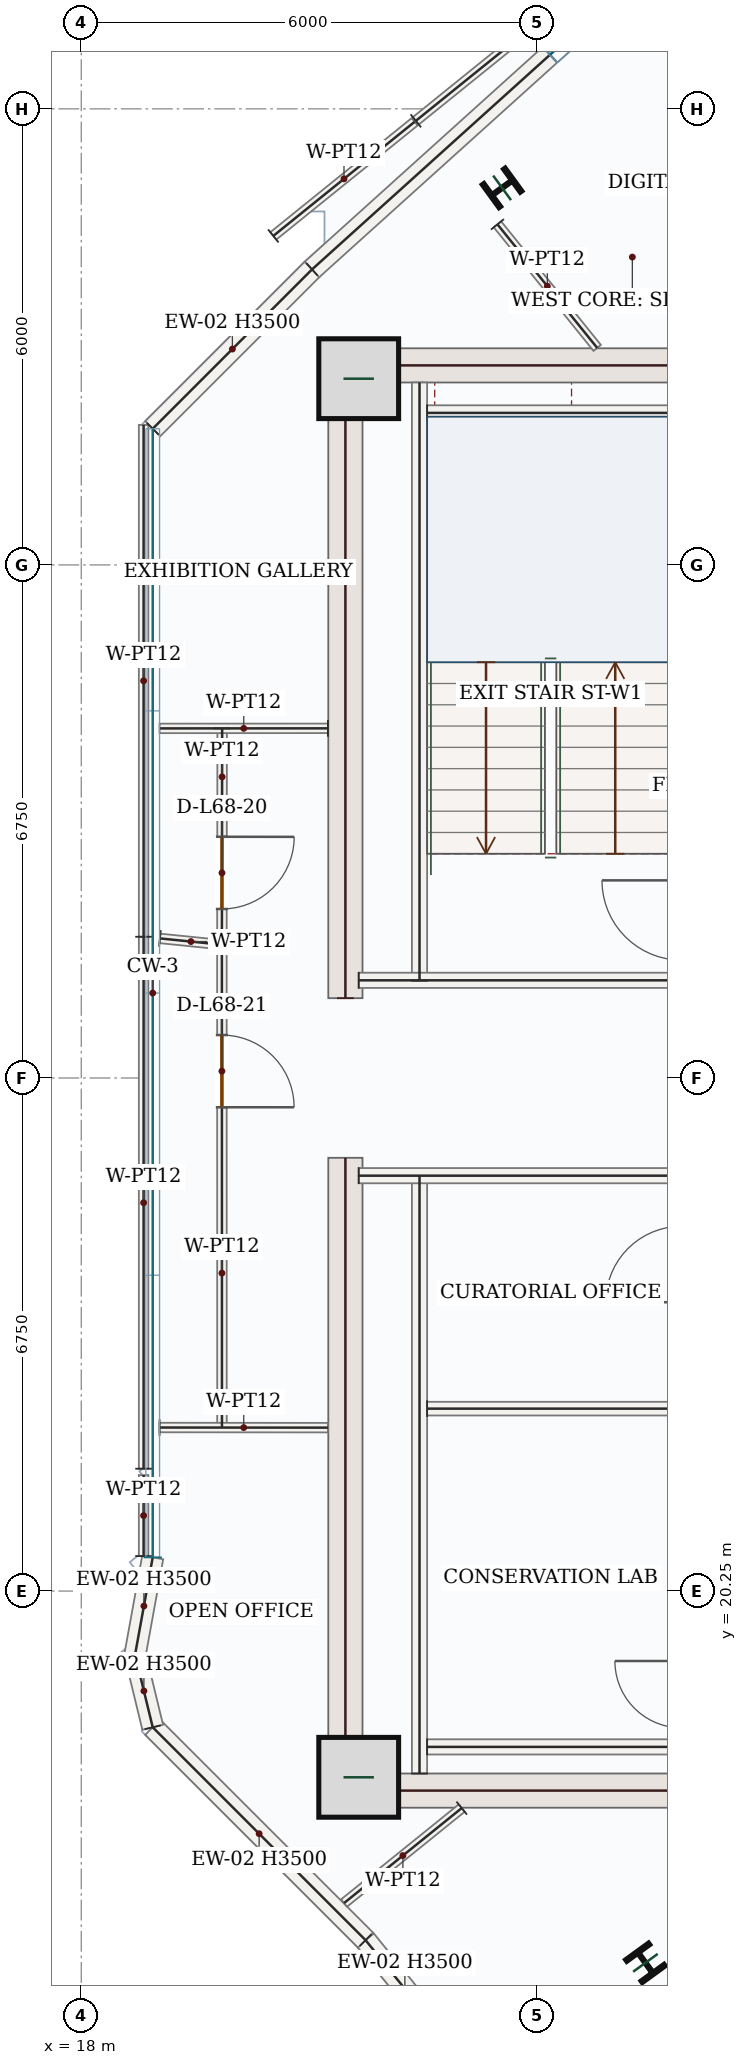
"""IFC4 building model, lengths in metres.
Left out: names, types, materials, properties, quantities, classifications, styles, units other than length and angle.
Written with IfcOpenShell. Run it as: python <this file> out.ifc"""

import sys

from ifc_helpers import new_model, si_unit, direction, frame, frame_2d, origin, origin_2d, place, context, subcontext, project, spatial, rectangle, i_section, extrude, source, transform, mapped, element, fill, save


model = new_model("IFC4")
c1 = context("Model", 3, precision=1e-05, world=origin(), true_north=direction((0.0, 1.0)))
c2 = subcontext(c1, "Body", "Model", "MODEL_VIEW")
j1 = project(units=[si_unit("LENGTHUNIT", "METRE"), si_unit("PLANEANGLEUNIT", "RADIAN")], contexts=[c1])
p1 = place(None, origin())
s1 = spatial("IfcSite", under=j1, at=p1, CompositionType="ELEMENT")
p2 = place(p1, origin())
s2 = spatial("IfcBuilding", under=s1, at=p2, CompositionType="ELEMENT")
p3 = place(p2, frame((0.0, 0.0, 284.1)))
s3 = spatial("IfcBuildingStorey", under=s2, at=p3, CompositionType="ELEMENT", Elevation=284.1)
m1 = source(origin(), c2, "Body", "SweptSolid", [
    extrude(rectangle(XDim=8.55, YDim=0.45, at=frame_2d((4.275, 0.0))), origin(), (0.0, 0.0, 1.0), 3.5),
])
for number, where, z_axis, x_axis in (
    (1, (21.475, 17.4, 0.0), (0.0, 0.0, 1.0), (0.0, 1.0, 0.0)),
    (2, (21.475, 28.05, 0.0), (0.0, 0.0, 1.0), (0.0, 1.0, 0.0)),
):
    element("IfcWall", number, at=place(p3, frame(where, z_axis=z_axis, x_axis=x_axis)), inside=s3, PredefinedType="SHEAR", context=c2, shape_type="MappedRepresentation", body=[
        mapped(m1, transform((0.0, 0.0, 0.0), x_axis=(1.0, 0.0, 0.0), y_axis=(0.0, 1.0, 0.0), z_axis=(0.0, 0.0, 1.0), scale=1.0)),
    ])
m2 = source(origin(), c2, "Body", "SweptSolid", [
    extrude(rectangle(XDim=7.1, YDim=0.45, at=frame_2d((3.55, 0.0))), origin(), (0.0, 0.0, 1.0), 3.5),
])
for number, where, z_axis, x_axis in (
    (3, (21.7, 17.625, 0.0), (0.0, 0.0, 1.0), (1.0, 0.0, 0.0)),
    (4, (21.7, 36.375, 0.0), (0.0, 0.0, 1.0), (1.0, 0.0, 0.0)),
):
    element("IfcWall", number, at=place(p3, frame(where, z_axis=z_axis, x_axis=x_axis)), inside=s3, PredefinedType="SHEAR", context=c2, shape_type="MappedRepresentation", body=[
        mapped(m2, transform((0.0, 0.0, 0.0), x_axis=(1.0, 0.0, 0.0), y_axis=(0.0, 1.0, 0.0), z_axis=(0.0, 0.0, 1.0), scale=1.0)),
    ])
m3 = source(origin(), c2, "Body", "SweptSolid", [
    extrude(rectangle(XDim=1.05, YDim=1.05, at=origin_2d()), origin(), (0.0, 0.0, 1.0), 3.75),
])
for number, where, z_axis, x_axis in (
    (5, (21.65, 17.8, 0.0), (0.0, 0.0, 1.0), (1.0, 0.0, 0.0)),
    (6, (21.65, 36.2, 0.0), (0.0, 0.0, 1.0), (1.0, 0.0, 0.0)),
):
    element("IfcColumn", number, at=place(p3, frame(where, z_axis=z_axis, x_axis=x_axis)), inside=s3, PredefinedType="COLUMN", context=c2, shape_type="MappedRepresentation", body=[
        mapped(m3, transform((0.0, 0.0, 0.0), x_axis=(1.0, 0.0, 0.0), y_axis=(0.0, 1.0, 0.0), z_axis=(0.0, 0.0, 1.0), scale=1.0)),
    ])
m4 = source(origin(), c2, "Body", "SweptSolid", [
    extrude(i_section(OverallWidth=0.374, OverallDepth=0.372, WebThickness=0.016, FlangeThickness=0.026, FilletRadius=0.018, at=origin_2d()), origin(), (0.0, 0.0, 1.0), 3.75),
])
for number, where, z_axis, x_axis in (
    (7, (23.536, 38.711, 0.0), (0.0, 0.0, 1.0), (-0.588, 0.809, 0.0)),
    (8, (25.422, 15.359, 0.0), (0.0, 0.0, 1.0), (0.809, 0.588, 0.0)),
):
    element("IfcColumn", number, at=place(p3, frame(where, z_axis=z_axis, x_axis=x_axis)), inside=s3, PredefinedType="COLUMN", context=c2, shape_type="MappedRepresentation", body=[
        mapped(m4, transform((0.0, 0.0, 0.0), x_axis=(1.0, 0.0, 0.0), y_axis=(0.0, 1.0, 0.0), z_axis=(0.0, 0.0, 1.0), scale=1.0)),
    ])
m5 = source(origin(), c2, "Body", "SweptSolid", [
    extrude(rectangle(XDim=2.964, YDim=0.28, at=frame_2d((1.482, 0.0))), origin(), (0.0, 0.0, 1.0), 3.5),
])
p4 = place(p3, frame((18.94, 35.542, 0.0), z_axis=(0.0, 0.0, 1.0), x_axis=(0.707106781187, 0.707106781187, 0.0)))
e9 = element("IfcWall", 9, at=p4, inside=s3, PredefinedType="SOLIDWALL", context=c2, shape_type="MappedRepresentation", body=[
    mapped(m5, transform((0.0, 0.0, 0.0), x_axis=(1.0, 0.0, 0.0), y_axis=(0.0, 1.0, 0.0), z_axis=(0.0, 0.0, 1.0), scale=1.0)),
])
p5 = place(p3, frame((21.036, 37.638, 0.0), z_axis=(0.0, 0.0, 1.0), x_axis=(0.742587457262, 0.669749108486, 0.0)))
e10 = element("IfcWall", 10, at=p5, inside=s3, PredefinedType="SOLIDWALL", context=c2, shape_type="SweptSolid", body=[
    extrude(rectangle(XDim=9.935, YDim=0.28, at=frame_2d((4.967, 0.0))), origin(), (0.0, 0.0, 1.0), 3.5),
])
p6 = place(p5, frame((4.217, 0.0, 0.85)))
e11 = element("IfcOpeningElement", 11, at=p6, cuts=e10, PredefinedType="OPENING", context=c2, shape_type="SweptSolid", body=[
    extrude(rectangle(XDim=1.5, YDim=1.5, at=frame_2d((0.75, 0.75))), frame((0.0, 0.15, 0.0), z_axis=(0.0, -1.0, 0.0), x_axis=(1.0, 0.0, 0.0)), (0.0, 0.0, 1.0), 0.3),
])
p7 = place(p3, frame((24.94, 11.695, 0.0), z_axis=(0.0, 0.0, 1.0), x_axis=(-0.628225517447, 0.778031297075, 0.0)))
e12 = element("IfcWall", 12, at=p7, inside=s3, PredefinedType="SOLIDWALL", context=c2, shape_type="SweptSolid", body=[
    extrude(rectangle(XDim=5.093, YDim=0.28, at=frame_2d((2.546, 0.0))), origin(), (0.0, 0.0, 1.0), 3.5),
])
p8 = place(p7, frame((1.796, 0.0, 0.85)))
e13 = element("IfcOpeningElement", 13, at=p8, cuts=e12, PredefinedType="OPENING", context=c2, shape_type="SweptSolid", body=[
    extrude(rectangle(XDim=1.5, YDim=1.5, at=frame_2d((0.75, 0.75))), frame((0.0, 0.15, 0.0), z_axis=(0.0, -1.0, 0.0), x_axis=(1.0, 0.0, 0.0)), (0.0, 0.0, 1.0), 0.3),
])
m6 = source(origin(), c2, "Body", "SweptSolid", [
    extrude(rectangle(XDim=3.96, YDim=0.28, at=frame_2d((1.98, 0.0))), origin(), (0.0, 0.0, 1.0), 3.5),
])
p9 = place(p3, frame((21.74, 15.658, 0.0), z_axis=(0.0, 0.0, 1.0), x_axis=(-0.707106781187, 0.707106781187, 0.0)))
e14 = element("IfcWall", 14, at=p9, inside=s3, PredefinedType="SOLIDWALL", context=c2, shape_type="MappedRepresentation", body=[
    mapped(m6, transform((0.0, 0.0, 0.0), x_axis=(1.0, 0.0, 0.0), y_axis=(0.0, 1.0, 0.0), z_axis=(0.0, 0.0, 1.0), scale=1.0)),
])
m7 = source(origin(), c2, "Body", "SweptSolid", [
    extrude(rectangle(XDim=0.983, YDim=0.28, at=frame_2d((0.492, 0.0))), origin(), (0.0, 0.0, 1.0), 3.5),
])
p10 = place(p3, frame((18.94, 18.458, 0.0), z_axis=(0.0, 0.0, 1.0), x_axis=(-0.235870049888, 0.971784605541, 0.0)))
e15 = element("IfcWall", 15, at=p10, inside=s3, PredefinedType="SOLIDWALL", context=c2, shape_type="MappedRepresentation", body=[
    mapped(m7, transform((0.0, 0.0, 0.0), x_axis=(1.0, 0.0, 0.0), y_axis=(0.0, 1.0, 0.0), z_axis=(0.0, 0.0, 1.0), scale=1.0)),
])
m8 = source(origin(), c2, "Body", "SweptSolid", [
    extrude(rectangle(XDim=1.301, YDim=0.28, at=frame_2d((0.65, 0.0))), origin(), (0.0, 0.0, 1.0), 3.5),
])
p11 = place(p3, frame((18.708, 19.414, 0.0), z_axis=(0.0, 0.0, 1.0), x_axis=(0.178323782993, 0.983971863632, 0.0)))
e16 = element("IfcWall", 16, at=p11, inside=s3, PredefinedType="SOLIDWALL", context=c2, shape_type="MappedRepresentation", body=[
    mapped(m8, transform((0.0, 0.0, 0.0), x_axis=(1.0, 0.0, 0.0), y_axis=(0.0, 1.0, 0.0), z_axis=(0.0, 0.0, 1.0), scale=1.0)),
])
m9 = source(origin(), c2, "Body", "SweptSolid", [
    extrude(rectangle(XDim=7.87, YDim=0.2, at=frame_2d((3.935, 0.0))), origin(), (0.0, 0.0, 1.0), 3.5),
])
for number, where, z_axis, x_axis in (
    (17, (22.45, 17.85, 0.0), (0.0, 0.0, 1.0), (0.0, 1.0, 0.0)),
    (18, (22.45, 28.28, 0.0), (0.0, 0.0, 1.0), (0.0, 1.0, 0.0)),
):
    element("IfcWall", number, at=place(p3, frame(where, z_axis=z_axis, x_axis=x_axis)), inside=s3, PredefinedType="SOLIDWALL", context=c2, shape_type="MappedRepresentation", body=[
        mapped(m9, transform((0.0, 0.0, 0.0), x_axis=(1.0, 0.0, 0.0), y_axis=(0.0, 1.0, 0.0), z_axis=(0.0, 0.0, 1.0), scale=1.0)),
    ])
m10 = source(origin(), c2, "Body", "SweptSolid", [
    extrude(rectangle(XDim=4.25, YDim=0.2, at=frame_2d((2.125, 0.0))), origin(), (0.0, 0.0, 1.0), 3.5),
])
for number, where, z_axis, x_axis in (
    (19, (21.65, 25.715, 0.0), (0.0, 0.0, 1.0), (1.0, 0.0, 0.0)),
    (20, (21.65, 28.285, 0.0), (0.0, 0.0, 1.0), (1.0, 0.0, 0.0)),
):
    element("IfcWall", number, at=place(p3, frame(where, z_axis=z_axis, x_axis=x_axis)), inside=s3, PredefinedType="SOLIDWALL", context=c2, shape_type="MappedRepresentation", body=[
        mapped(m10, transform((0.0, 0.0, 0.0), x_axis=(1.0, 0.0, 0.0), y_axis=(0.0, 1.0, 0.0), z_axis=(0.0, 0.0, 1.0), scale=1.0)),
    ])
m11 = source(origin(), c2, "Body", "SweptSolid", [
    extrude(rectangle(XDim=3.25, YDim=0.2, at=frame_2d((1.625, 0.0))), origin(), (0.0, 0.0, 1.0), 3.5),
])
for number, where, z_axis, x_axis in (
    (21, (22.55, 35.75, 0.0), (0.0, 0.0, 1.0), (1.0, 0.0, 0.0)),
    (22, (22.55, 18.2, 0.0), (0.0, 0.0, 1.0), (1.0, 0.0, 0.0)),
):
    element("IfcWall", number, at=place(p3, frame(where, z_axis=z_axis, x_axis=x_axis)), inside=s3, PredefinedType="SOLIDWALL", context=c2, shape_type="MappedRepresentation", body=[
        mapped(m11, transform((0.0, 0.0, 0.0), x_axis=(1.0, 0.0, 0.0), y_axis=(0.0, 1.0, 0.0), z_axis=(0.0, 0.0, 1.0), scale=1.0)),
    ])
m12 = source(origin(), c2, "Body", "SweptSolid", [
    extrude(rectangle(XDim=3.25, YDim=0.18, at=frame_2d((1.625, 0.0))), origin(), (0.0, 0.0, 1.0), 3.5),
])
p12 = place(p3, frame((22.55, 22.65, 0.0), z_axis=(0.0, 0.0, 1.0), x_axis=(1.0, 0.0, 0.0)))
e23 = element("IfcWall", 23, at=p12, inside=s3, PredefinedType="PARTITIONING", context=c2, shape_type="MappedRepresentation", body=[
    mapped(m12, transform((0.0, 0.0, 0.0), x_axis=(1.0, 0.0, 0.0), y_axis=(0.0, 1.0, 0.0), z_axis=(0.0, 0.0, 1.0), scale=1.0)),
])
p13 = place(p3, frame((19.85, 28.754, 0.0), z_axis=(0.0, 0.0, 1.0), x_axis=(0.000153721992, -0.999999988185, 0.0)))
e24 = element("IfcWall", 24, at=p13, inside=s3, PredefinedType="PARTITIONING", context=c2, shape_type="SweptSolid", body=[
    extrude(rectangle(XDim=6.353, YDim=0.125, at=frame_2d((3.176, 0.0))), origin(), (0.0, 0.0, 1.0), 3.5),
])
p14 = place(p13, frame((1.189, 0.0, 0.0)))
e25 = element("IfcOpeningElement", 25, at=p14, cuts=e24, PredefinedType="OPENING", context=c2, shape_type="SweptSolid", body=[
    extrude(rectangle(XDim=0.95, YDim=2.15, at=frame_2d((0.475, 1.075))), frame((0.0, 0.073, 0.0), z_axis=(0.0, -1.0, 0.0), x_axis=(1.0, 0.0, 0.0)), (0.0, 0.0, 1.0), 0.145),
])
m13 = source(origin(), c2, "Body", "SweptSolid", [
    extrude(rectangle(XDim=2.215, YDim=0.125, at=frame_2d((1.107, 0.0))), origin(), (0.0, 0.0, 1.0), 3.5),
])
p15 = place(p3, frame((19.03, 22.402, 0.0), z_axis=(0.0, 0.0, 1.0), x_axis=(0.999999702379, -0.000771519665, 0.0)))
e26 = element("IfcWall", 26, at=p15, inside=s3, PredefinedType="PARTITIONING", context=c2, shape_type="MappedRepresentation", body=[
    mapped(m13, transform((0.0, 0.0, 0.0), x_axis=(1.0, 0.0, 0.0), y_axis=(0.0, 1.0, 0.0), z_axis=(0.0, 0.0, 1.0), scale=1.0)),
])
m14 = source(origin(), c2, "Body", "SweptSolid", [
    extrude(rectangle(XDim=1.989, YDim=0.125, at=frame_2d((0.995, 0.0))), origin(), (0.0, 0.0, 1.0), 3.5),
])
p16 = place(p3, frame((23.005, 17.395, 0.0), z_axis=(0.0, 0.0, 1.0), x_axis=(-0.778058853423, -0.628191388519, 0.0)))
e27 = element("IfcWall", 27, at=p16, inside=s3, PredefinedType="PARTITIONING", context=c2, shape_type="MappedRepresentation", body=[
    mapped(m14, transform((0.0, 0.0, 0.0), x_axis=(1.0, 0.0, 0.0), y_axis=(0.0, 1.0, 0.0), z_axis=(0.0, 0.0, 1.0), scale=1.0)),
])
m15 = source(origin(), c2, "Body", "SweptSolid", [
    extrude(rectangle(XDim=1.066, YDim=0.125, at=frame_2d((0.533, 0.0))), origin(), (0.0, 0.0, 1.0), 3.5),
])
p17 = place(p3, frame((18.82, 20.71, 0.0), z_axis=(0.0, 0.0, 1.0), x_axis=(0.0, 1.0, 0.0)))
e28 = element("IfcWall", 28, at=p17, inside=s3, PredefinedType="PARTITIONING", context=c2, shape_type="MappedRepresentation", body=[
    mapped(m15, transform((0.0, 0.0, 0.0), x_axis=(1.0, 0.0, 0.0), y_axis=(0.0, 1.0, 0.0), z_axis=(0.0, 0.0, 1.0), scale=1.0)),
])
m16 = source(origin(), c2, "Body", "SweptSolid", [
    extrude(rectangle(XDim=6.999, YDim=0.125, at=frame_2d((3.499, 0.0))), origin(), (0.0, 0.0, 1.0), 3.5),
])
p18 = place(p3, frame((18.82, 21.86, 0.0), z_axis=(0.0, 0.0, 1.0), x_axis=(0.0, 1.0, 0.0)))
e29 = element("IfcWall", 29, at=p18, inside=s3, PredefinedType="PARTITIONING", context=c2, shape_type="MappedRepresentation", body=[
    mapped(m16, transform((0.0, 0.0, 0.0), x_axis=(1.0, 0.0, 0.0), y_axis=(0.0, 1.0, 0.0), z_axis=(0.0, 0.0, 1.0), scale=1.0)),
])
m17 = source(origin(), c2, "Body", "SweptSolid", [
    extrude(rectangle(XDim=0.819, YDim=0.125, at=frame_2d((0.41, 0.0))), origin(), (0.0, 0.0, 1.0), 3.5),
])
p19 = place(p3, frame((19.035, 28.836, 0.0), z_axis=(0.0, 0.0, 1.0), x_axis=(0.994885598115, -0.101008151471, 0.0)))
e30 = element("IfcWall", 30, at=p19, inside=s3, PredefinedType="PARTITIONING", context=c2, shape_type="MappedRepresentation", body=[
    mapped(m17, transform((0.0, 0.0, 0.0), x_axis=(1.0, 0.0, 0.0), y_axis=(0.0, 1.0, 0.0), z_axis=(0.0, 0.0, 1.0), scale=1.0)),
])
p20 = place(p3, frame((19.854, 31.6, 0.0), z_axis=(0.0, 0.0, 1.0), x_axis=(-0.00123022754, -0.99999924327, 0.0)))
e31 = element("IfcWall", 31, at=p20, inside=s3, PredefinedType="PARTITIONING", context=c2, shape_type="SweptSolid", body=[
    extrude(rectangle(XDim=2.778, YDim=0.125, at=frame_2d((1.389, 0.0))), origin(), (0.0, 0.0, 1.0), 3.5),
])
p21 = place(p20, frame((1.426, 0.0, 0.0)))
e32 = element("IfcOpeningElement", 32, at=p21, cuts=e31, PredefinedType="OPENING", context=c2, shape_type="SweptSolid", body=[
    extrude(rectangle(XDim=0.95, YDim=2.15, at=frame_2d((0.475, 1.075))), frame((0.0, 0.073, 0.0), z_axis=(0.0, -1.0, 0.0), x_axis=(1.0, 0.0, 0.0)), (0.0, 0.0, 1.0), 0.145),
])
m18 = source(origin(), c2, "Body", "SweptSolid", [
    extrude(rectangle(XDim=6.734, YDim=0.125, at=frame_2d((3.367, 0.0))), origin(), (0.0, 0.0, 1.0), 3.5),
])
p22 = place(p3, frame((18.82, 28.858, 0.0), z_axis=(0.0, 0.0, 1.0), x_axis=(0.0, 1.0, 0.0)))
e33 = element("IfcWall", 33, at=p22, inside=s3, PredefinedType="PARTITIONING", context=c2, shape_type="MappedRepresentation", body=[
    mapped(m18, transform((0.0, 0.0, 0.0), x_axis=(1.0, 0.0, 0.0), y_axis=(0.0, 1.0, 0.0), z_axis=(0.0, 0.0, 1.0), scale=1.0)),
])
m19 = source(origin(), c2, "Body", "SweptSolid", [
    extrude(rectangle(XDim=2.39, YDim=0.125, at=frame_2d((1.195, 0.0))), origin(), (0.0, 0.0, 1.0), 3.5),
])
p23 = place(p3, frame((20.527, 38.078, 0.0), z_axis=(0.0, 0.0, 1.0), x_axis=(0.778010315123, 0.628251501839, 0.0)))
e34 = element("IfcWall", 34, at=p23, inside=s3, PredefinedType="PARTITIONING", context=c2, shape_type="MappedRepresentation", body=[
    mapped(m19, transform((0.0, 0.0, 0.0), x_axis=(1.0, 0.0, 0.0), y_axis=(0.0, 1.0, 0.0), z_axis=(0.0, 0.0, 1.0), scale=1.0)),
])
m20 = source(origin(), c2, "Body", "SweptSolid", [
    extrude(rectangle(XDim=2.089, YDim=0.125, at=frame_2d((1.045, 0.0))), origin(), (0.0, 0.0, 1.0), 3.5),
])
p24 = place(p3, frame((23.475, 38.231, 0.0), z_axis=(0.0, 0.0, 1.0), x_axis=(0.628165745158, -0.778079556735, 0.0)))
e35 = element("IfcWall", 35, at=p24, inside=s3, PredefinedType="PARTITIONING", context=c2, shape_type="MappedRepresentation", body=[
    mapped(m20, transform((0.0, 0.0, 0.0), x_axis=(1.0, 0.0, 0.0), y_axis=(0.0, 1.0, 0.0), z_axis=(0.0, 0.0, 1.0), scale=1.0)),
])
p25 = place(p3, frame((21.245, 31.6, 0.0), z_axis=(0.0, 0.0, 1.0), x_axis=(-0.999999902817, -0.000440868468, 0.0)))
e36 = element("IfcWall", 36, at=p25, inside=s3, PredefinedType="PARTITIONING", context=c2, shape_type="MappedRepresentation", body=[
    mapped(m13, transform((0.0, 0.0, 0.0), x_axis=(1.0, 0.0, 0.0), y_axis=(0.0, 1.0, 0.0), z_axis=(0.0, 0.0, 1.0), scale=1.0)),
])
m21 = source(origin(), c2, "Body", "SweptSolid", [
    extrude(rectangle(XDim=4.72, YDim=0.125, at=frame_2d((2.36, 0.0))), origin(), (0.0, 0.0, 1.0), 3.5),
])
p26 = place(p3, frame((22.402, 39.592, 0.0), z_axis=(0.0, 0.0, 1.0), x_axis=(0.778024801452, 0.628233561922, 0.0)))
e37 = element("IfcWall", 37, at=p26, inside=s3, PredefinedType="PARTITIONING", context=c2, shape_type="MappedRepresentation", body=[
    mapped(m21, transform((0.0, 0.0, 0.0), x_axis=(1.0, 0.0, 0.0), y_axis=(0.0, 1.0, 0.0), z_axis=(0.0, 0.0, 1.0), scale=1.0)),
])
m22 = source(origin(), c2, "Body", "SweptSolid", [
    extrude(rectangle(XDim=1.5, YDim=1.5, at=frame_2d((0.75, 0.75))), frame((0.0, 0.03, 0.0), z_axis=(0.0, -1.0, 0.0), x_axis=(1.0, 0.0, 0.0)), (0.0, 0.0, 1.0), 0.06),
])
p27 = place(p6, origin())
e38 = element("IfcWindow", 38, at=p27, inside=s3, PartitioningType="SINGLE_PANEL", PredefinedType="WINDOW", context=c2, shape_type="MappedRepresentation", body=[
    mapped(m22, transform((0.0, 0.0, 0.0), x_axis=(1.0, 0.0, 0.0), y_axis=(0.0, 1.0, 0.0), z_axis=(0.0, 0.0, 1.0), scale=1.0)),
])
fill(e11, e38)
m23 = source(origin(), c2, "Body", "SweptSolid", [
    extrude(rectangle(XDim=0.95, YDim=2.15, at=frame_2d((0.475, 1.075))), frame((0.0, 0.025, 0.0), z_axis=(0.0, -1.0, 0.0), x_axis=(1.0, 0.0, 0.0)), (0.0, 0.0, 1.0), 0.05),
])
p28 = place(p21, origin())
e39 = element("IfcDoor", 39, at=p28, inside=s3, OperationType="SINGLE_SWING_LEFT", PredefinedType="DOOR", context=c2, shape_type="MappedRepresentation", body=[
    mapped(m23, transform((0.0, 0.0, 0.0), x_axis=(1.0, 0.0, 0.0), y_axis=(0.0, 1.0, 0.0), z_axis=(0.0, 0.0, 1.0), scale=1.0)),
])
fill(e32, e39)
p29 = place(p14, origin())
e40 = element("IfcDoor", 40, at=p29, inside=s3, OperationType="SINGLE_SWING_RIGHT", PredefinedType="DOOR", context=c2, shape_type="MappedRepresentation", body=[
    mapped(m23, transform((0.0, 0.0, 0.0), x_axis=(1.0, 0.0, 0.0), y_axis=(0.0, 1.0, 0.0), z_axis=(0.0, 0.0, 1.0), scale=1.0)),
])
fill(e25, e40)
save(model, sys.argv[1])
